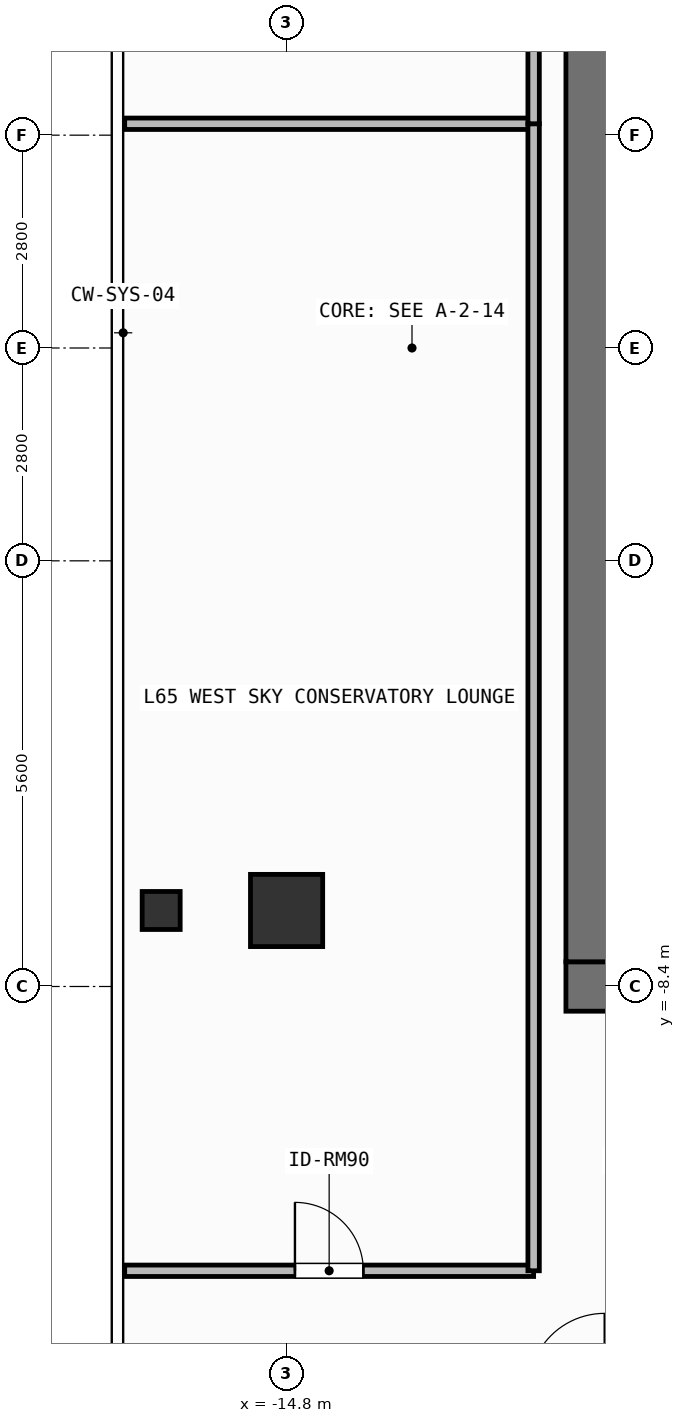
"""IFC4 building model, lengths in metres.
Left out: names, types, materials, properties, quantities, classifications, styles, units other than length and angle.
Written with IfcOpenShell. Run it as: python <this file> out.ifc"""

import sys

from ifc_helpers import new_model, si_unit, direction, frame, frame_2d, origin, origin_2d, place, context, subcontext, project, spatial, rectangle, hollow_rectangle, extrude, element, fill, save


model = new_model("IFC4")
c1 = context("Model", 3, precision=1e-05, world=origin(), true_north=direction((0.0, 1.0)))
c2 = subcontext(c1, "Body", "Model", "MODEL_VIEW")
j1 = project(units=[si_unit("LENGTHUNIT", "METRE"), si_unit("PLANEANGLEUNIT", "RADIAN")], contexts=[c1])
p1 = place(None, origin())
s1 = spatial("IfcSite", under=j1, at=p1, CompositionType="ELEMENT")
p2 = place(p1, origin())
s2 = spatial("IfcBuilding", under=s1, at=p2, CompositionType="ELEMENT")
p3 = place(p2, frame((0.0, 0.0, 266.4)))
s3 = spatial("IfcBuildingStorey", under=s2, at=p3, CompositionType="ELEMENT", Elevation=266.4)
p4 = place(p3, frame((-11.125, -8.4, 0.0), z_axis=(0.0, 0.0, 1.0), x_axis=(1.0, 0.0, 0.0)))
e1 = element("IfcWall", 1, at=p4, inside=s3, PredefinedType="SHEAR", context=c2, shape_type="SweptSolid", body=[
    extrude(rectangle(XDim=1.425, YDim=0.65, at=frame_2d((0.712, 0.0))), origin(), (0.0, 0.0, 1.0), 3.9),
])
p5 = place(p3, frame((-10.8, -8.075, 0.0), z_axis=(0.0, 0.0, 1.0), x_axis=(0.0, 1.0, 0.0)))
e2 = element("IfcWall", 2, at=p5, inside=s3, PredefinedType="SHEAR", context=c2, shape_type="SweptSolid", body=[
    extrude(rectangle(XDim=16.15, YDim=0.65, at=frame_2d((8.075, 0.0))), origin(), (0.0, 0.0, 1.0), 3.9),
])
p6 = place(p3, frame((-14.8, -7.4, 0.0), z_axis=(0.0, 0.0, 1.0), x_axis=(1.0, 0.0, 0.0)))
e3 = element("IfcColumn", 3, at=p6, inside=s3, PredefinedType="COLUMN", context=c2, shape_type="SweptSolid", body=[
    extrude(rectangle(XDim=0.95, YDim=0.95, at=origin_2d()), origin(), (0.0, 0.0, 1.0), 3.9),
])
p7 = place(p3, frame((-16.45, -7.4, 0.0), z_axis=(0.0, 0.0, 1.0), x_axis=(1.0, 0.0, 0.0)))
e4 = element("IfcColumn", 4, at=p7, inside=s3, PredefinedType="COLUMN", context=c2, shape_type="SweptSolid", body=[
    extrude(hollow_rectangle(XDim=0.5, YDim=0.5, WallThickness=0.025, at=origin_2d()), origin(), (0.0, 0.0, 1.0), 3.9),
])
p8 = place(p3, frame((-16.93, -12.14, 0.0), z_axis=(0.0, 0.0, 1.0), x_axis=(1.0, 0.0, 0.0)))
e5 = element("IfcWall", 5, at=p8, inside=s3, PredefinedType="PARTITIONING", context=c2, shape_type="SweptSolid", body=[
    extrude(rectangle(XDim=5.38, YDim=0.15, at=frame_2d((2.69, 0.0))), origin(), (0.0, 0.0, 1.0), 3.68),
])
p9 = place(p8, frame((2.24, 0.0, 0.0)))
e6 = element("IfcOpeningElement", 6, at=p9, cuts=e5, PredefinedType="OPENING", context=c2, shape_type="SweptSolid", body=[
    extrude(rectangle(XDim=0.9, YDim=2.1, at=frame_2d((0.45, 1.05))), frame((0.0, 0.085, 0.0), z_axis=(0.0, -1.0, 0.0), x_axis=(1.0, 0.0, 0.0)), (0.0, 0.0, 1.0), 0.17),
])
p10 = place(p3, frame((-16.93, 2.95, 0.0), z_axis=(0.0, 0.0, 1.0), x_axis=(1.0, 0.0, 0.0)))
e7 = element("IfcWall", 7, at=p10, inside=s3, PredefinedType="PARTITIONING", context=c2, shape_type="SweptSolid", body=[
    extrude(rectangle(XDim=5.38, YDim=0.15, at=frame_2d((2.69, 0.0))), origin(), (0.0, 0.0, 1.0), 3.68),
])
p11 = place(p3, frame((-11.55, -12.14, 0.0), z_axis=(0.0, 0.0, 1.0), x_axis=(0.0, 1.0, 0.0)))
e8 = element("IfcWall", 8, at=p11, inside=s3, PredefinedType="PARTITIONING", context=c2, shape_type="SweptSolid", body=[
    extrude(rectangle(XDim=15.09, YDim=0.15, at=frame_2d((7.545, 0.0))), origin(), (0.0, 0.0, 1.0), 3.68),
])
p12 = place(p3, frame((-11.55, 2.95, 0.0), z_axis=(0.0, 0.0, 1.0), x_axis=(0.0, 1.0, 0.0)))
e9 = element("IfcWall", 9, at=p12, inside=s3, PredefinedType="PARTITIONING", context=c2, shape_type="SweptSolid", body=[
    extrude(rectangle(XDim=9.19, YDim=0.15, at=frame_2d((4.595, 0.0))), origin(), (0.0, 0.0, 1.0), 3.68),
])
p13 = place(p9, origin())
e10 = element("IfcDoor", 10, at=p13, inside=s3, OperationType="SINGLE_SWING_LEFT", PredefinedType="DOOR", context=c2, shape_type="SweptSolid", body=[
    extrude(rectangle(XDim=0.9, YDim=2.1, at=frame_2d((0.45, 1.05))), frame((0.0, 0.025, 0.0), z_axis=(0.0, -1.0, 0.0), x_axis=(1.0, 0.0, 0.0)), (0.0, 0.0, 1.0), 0.05),
])
fill(e6, e10)
save(model, sys.argv[1])
